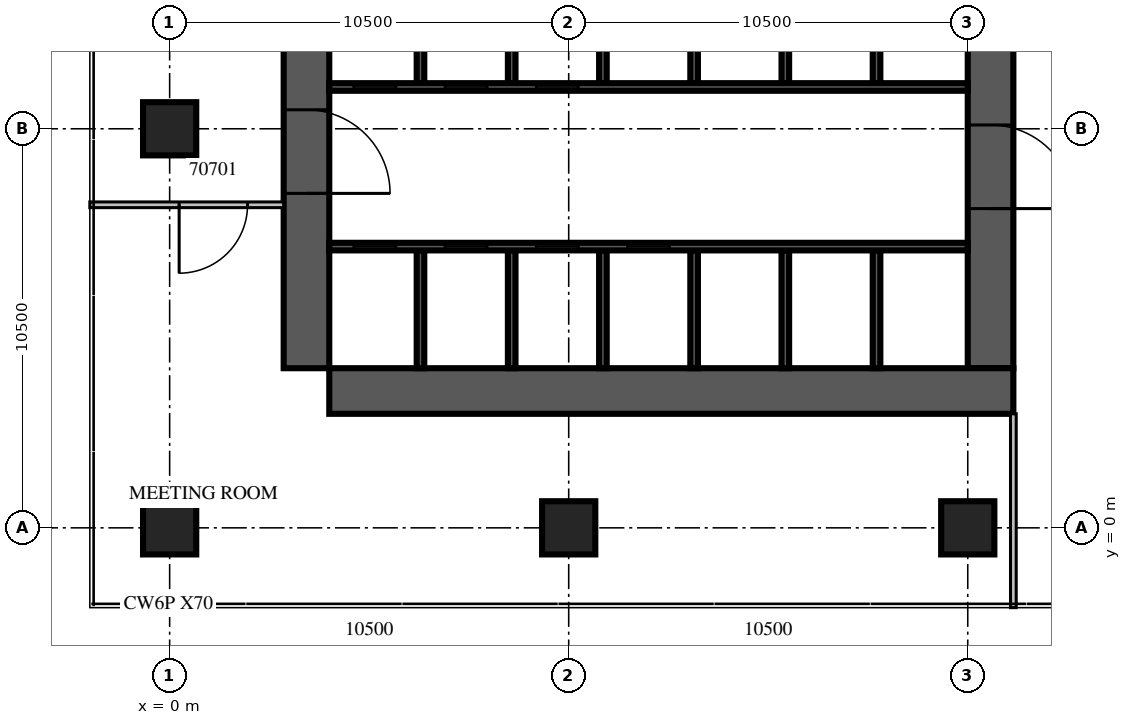
"""IFC4 building model, lengths in metres.
Left out: names, types, materials, properties, quantities, classifications, styles, units other than length and angle.
Written with IfcOpenShell. Run it as: python <this file> out.ifc"""

import sys

from ifc_helpers import new_model, si_unit, direction, frame, frame_2d, origin, origin_2d, place, context, subcontext, project, spatial, rectangle, extrude, source, transform, mapped, element, fill, save


model = new_model("IFC4")
c1 = context("Model", 3, precision=1e-05, world=origin(), true_north=direction((0.0, 1.0)))
c2 = subcontext(c1, "Body", "Model", "MODEL_VIEW")
j1 = project(units=[si_unit("LENGTHUNIT", "METRE"), si_unit("PLANEANGLEUNIT", "RADIAN")], contexts=[c1])
p1 = place(None, origin())
s1 = spatial("IfcSite", under=j1, at=p1, CompositionType="ELEMENT")
p2 = place(p1, origin())
s2 = spatial("IfcBuilding", under=s1, at=p2, CompositionType="ELEMENT")
p3 = place(p2, frame((0.0, 0.0, 23.7)))
s3 = spatial("IfcBuildingStorey", under=s2, at=p3, CompositionType="ELEMENT", Elevation=23.7)
m1 = source(origin(), c2, "Body", "SweptSolid", [
    extrude(rectangle(XDim=1.4, YDim=1.4, at=origin_2d()), origin(), (0.0, 0.0, 1.0), 5.4),
])
for number, where, z_axis, x_axis in (
    (1, (0.0, 0.0, 0.0), (0.0, 0.0, 1.0), (1.0, 0.0, 0.0)),
    (2, (0.0, 10.5, 0.0), (0.0, 0.0, 1.0), (1.0, 0.0, 0.0)),
    (3, (10.5, 0.0, 0.0), (0.0, 0.0, 1.0), (1.0, 0.0, 0.0)),
    (4, (21.0, 0.0, 0.0), (0.0, 0.0, 1.0), (1.0, 0.0, 0.0)),
):
    element("IfcColumn", number, at=place(p3, frame(where, z_axis=z_axis, x_axis=x_axis)), inside=s3, PredefinedType="COLUMN", context=c2, shape_type="MappedRepresentation", body=[
        mapped(m1, transform((0.0, 0.0, 0.0), scale=1.0)),
    ])
m2 = source(origin(), c2, "Body", "SweptSolid", [
    extrude(rectangle(XDim=18.0, YDim=1.2, at=frame_2d((9.0, 0.0))), origin(), (0.0, 0.0, 1.0), 5.4),
])
p4 = place(p3, frame((3.6, 4.2, 0.0), z_axis=(0.0, 0.0, 1.0), x_axis=(0.0, 1.0, 0.0)))
e5 = element("IfcWall", 5, at=p4, inside=s3, PredefinedType="SHEAR", context=c2, shape_type="MappedRepresentation", body=[
    mapped(m2, transform((0.0, 0.0, 0.0), scale=1.0)),
])
m3 = source(origin(), c2, "Body", "SweptSolid", [
    extrude(rectangle(XDim=2.2, YDim=2.1, at=frame_2d((1.1, 1.05))), frame((0.0, 0.61, 0.0), z_axis=(0.0, -1.0, 0.0), x_axis=(1.0, 0.0, 0.0)), (0.0, 0.0, 1.0), 1.22),
])
p5 = place(p4, frame((4.6, 0.0, 0.0)))
e6 = element("IfcOpeningElement", 6, at=p5, cuts=e5, PredefinedType="OPENING", context=c2, shape_type="MappedRepresentation", body=[
    mapped(m3, transform((0.0, 0.0, 0.0), scale=1.0)),
])
m4 = source(origin(), c2, "Body", "SweptSolid", [
    extrude(rectangle(XDim=16.8, YDim=1.2, at=frame_2d((8.4, 0.0))), origin(), (0.0, 0.0, 1.0), 5.4),
])
p6 = place(p3, frame((21.6, 4.2, 0.0), z_axis=(0.0, 0.0, 1.0), x_axis=(0.0, 1.0, 0.0)))
e7 = element("IfcWall", 7, at=p6, inside=s3, PredefinedType="SHEAR", context=c2, shape_type="MappedRepresentation", body=[
    mapped(m4, transform((0.0, 0.0, 0.0), scale=1.0)),
])
p7 = place(p6, frame((4.2, 0.0, 0.0)))
e8 = element("IfcOpeningElement", 8, at=p7, cuts=e7, PredefinedType="OPENING", context=c2, shape_type="MappedRepresentation", body=[
    mapped(m3, transform((0.0, 0.0, 0.0), scale=1.0)),
])
m5 = source(origin(), c2, "Body", "SweptSolid", [
    extrude(rectangle(XDim=1.2, YDim=2.1, at=frame_2d((0.6, 1.05))), frame((0.0, 0.61, 0.0), z_axis=(0.0, -1.0, 0.0), x_axis=(1.0, 0.0, 0.0)), (0.0, 0.0, 1.0), 1.22),
])
p8 = place(p6, frame((14.7, 0.0, 0.0)))
e9 = element("IfcOpeningElement", 9, at=p8, cuts=e7, PredefinedType="OPENING", context=c2, shape_type="MappedRepresentation", body=[
    mapped(m5, transform((0.0, 0.0, 0.0), scale=1.0)),
])
p9 = place(p3, frame((4.2, 3.6, 0.0), z_axis=(0.0, 0.0, 1.0), x_axis=(1.0, 0.0, 0.0)))
e10 = element("IfcWall", 10, at=p9, inside=s3, PredefinedType="SHEAR", context=c2, shape_type="MappedRepresentation", body=[
    mapped(m2, transform((0.0, 0.0, 0.0), scale=1.0)),
])
m6 = source(origin(), c2, "Body", "SweptSolid", [
    extrude(rectangle(XDim=3.1, YDim=0.2, at=frame_2d((1.55, 0.0))), origin(), (0.0, 0.0, 1.0), 5.4),
])
for number, where, z_axis, x_axis in (
    (11, (6.6, 4.2, 0.0), (0.0, 0.0, 1.0), (0.0, 1.0, 0.0)),
    (12, (9.0, 4.2, 0.0), (0.0, 0.0, 1.0), (0.0, 1.0, 0.0)),
    (13, (11.4, 4.2, 0.0), (0.0, 0.0, 1.0), (0.0, 1.0, 0.0)),
    (14, (13.8, 4.2, 0.0), (0.0, 0.0, 1.0), (0.0, 1.0, 0.0)),
    (15, (16.2, 4.2, 0.0), (0.0, 0.0, 1.0), (0.0, 1.0, 0.0)),
    (16, (18.6, 4.2, 0.0), (0.0, 0.0, 1.0), (0.0, 1.0, 0.0)),
):
    element("IfcWall", number, at=place(p3, frame(where, z_axis=z_axis, x_axis=x_axis)), inside=s3, PredefinedType="SOLIDWALL", context=c2, shape_type="MappedRepresentation", body=[
        mapped(m6, transform((0.0, 0.0, 0.0), scale=1.0)),
    ])
m7 = source(origin(), c2, "Body", "SweptSolid", [
    extrude(rectangle(XDim=3.0, YDim=0.2, at=frame_2d((1.5, 0.0))), origin(), (0.0, 0.0, 1.0), 5.4),
])
for number, where, z_axis, x_axis in (
    (17, (6.6, 11.7, 0.0), (0.0, 0.0, 1.0), (0.0, 1.0, 0.0)),
    (18, (9.0, 11.7, 0.0), (0.0, 0.0, 1.0), (0.0, 1.0, 0.0)),
    (19, (11.4, 11.7, 0.0), (0.0, 0.0, 1.0), (0.0, 1.0, 0.0)),
    (20, (13.8, 11.7, 0.0), (0.0, 0.0, 1.0), (0.0, 1.0, 0.0)),
    (21, (16.2, 11.7, 0.0), (0.0, 0.0, 1.0), (0.0, 1.0, 0.0)),
    (22, (18.6, 11.7, 0.0), (0.0, 0.0, 1.0), (0.0, 1.0, 0.0)),
):
    element("IfcWall", number, at=place(p3, frame(where, z_axis=z_axis, x_axis=x_axis)), inside=s3, PredefinedType="SOLIDWALL", context=c2, shape_type="MappedRepresentation", body=[
        mapped(m7, transform((0.0, 0.0, 0.0), scale=1.0)),
    ])
m8 = source(origin(), c2, "Body", "SweptSolid", [
    extrude(rectangle(XDim=16.8, YDim=0.2, at=frame_2d((8.4, 0.0))), origin(), (0.0, 0.0, 1.0), 5.4),
])
p10 = place(p3, frame((4.2, 7.4, 0.0), z_axis=(0.0, 0.0, 1.0), x_axis=(1.0, 0.0, 0.0)))
e23 = element("IfcWall", 23, at=p10, inside=s3, PredefinedType="SOLIDWALL", context=c2, shape_type="MappedRepresentation", body=[
    mapped(m8, transform((0.0, 0.0, 0.0), scale=1.0)),
])
m9 = source(origin(), c2, "Body", "SweptSolid", [
    extrude(rectangle(XDim=1.1, YDim=2.1, at=frame_2d((0.55, 1.05))), frame((0.0, 0.11, 0.0), z_axis=(0.0, -1.0, 0.0), x_axis=(1.0, 0.0, 0.0)), (0.0, 0.0, 1.0), 0.22),
])
p11 = place(p10, frame((0.65, 0.0, 0.0)))
e24 = element("IfcOpeningElement", 24, at=p11, cuts=e23, PredefinedType="OPENING", context=c2, shape_type="MappedRepresentation", body=[
    mapped(m9, transform((0.0, 0.0, 0.0), scale=1.0)),
])
p12 = place(p10, frame((3.05, 0.0, 0.0)))
e25 = element("IfcOpeningElement", 25, at=p12, cuts=e23, PredefinedType="OPENING", context=c2, shape_type="MappedRepresentation", body=[
    mapped(m9, transform((0.0, 0.0, 0.0), scale=1.0)),
])
p13 = place(p10, frame((5.45, 0.0, 0.0)))
e26 = element("IfcOpeningElement", 26, at=p13, cuts=e23, PredefinedType="OPENING", context=c2, shape_type="MappedRepresentation", body=[
    mapped(m9, transform((0.0, 0.0, 0.0), scale=1.0)),
])
p14 = place(p10, frame((7.85, 0.0, 0.0)))
e27 = element("IfcOpeningElement", 27, at=p14, cuts=e23, PredefinedType="OPENING", context=c2, shape_type="MappedRepresentation", body=[
    mapped(m9, transform((0.0, 0.0, 0.0), scale=1.0)),
])
p15 = place(p3, frame((4.2, 11.6, 0.0), z_axis=(0.0, 0.0, 1.0), x_axis=(1.0, 0.0, 0.0)))
e28 = element("IfcWall", 28, at=p15, inside=s3, PredefinedType="SOLIDWALL", context=c2, shape_type="MappedRepresentation", body=[
    mapped(m8, transform((0.0, 0.0, 0.0), scale=1.0)),
])
p16 = place(p15, frame((0.65, 0.0, 0.0)))
e29 = element("IfcOpeningElement", 29, at=p16, cuts=e28, PredefinedType="OPENING", context=c2, shape_type="MappedRepresentation", body=[
    mapped(m9, transform((0.0, 0.0, 0.0), scale=1.0)),
])
p17 = place(p15, frame((3.05, 0.0, 0.0)))
e30 = element("IfcOpeningElement", 30, at=p17, cuts=e28, PredefinedType="OPENING", context=c2, shape_type="MappedRepresentation", body=[
    mapped(m9, transform((0.0, 0.0, 0.0), scale=1.0)),
])
p18 = place(p15, frame((5.45, 0.0, 0.0)))
e31 = element("IfcOpeningElement", 31, at=p18, cuts=e28, PredefinedType="OPENING", context=c2, shape_type="MappedRepresentation", body=[
    mapped(m9, transform((0.0, 0.0, 0.0), scale=1.0)),
])
m10 = source(origin(), c2, "Body", "SweptSolid", [
    extrude(rectangle(XDim=5.1, YDim=0.15, at=frame_2d((2.55, 0.0))), origin(), (0.0, 0.0, 1.0), 4.8),
])
p19 = place(p3, frame((-2.1, 8.5, 0.0), z_axis=(0.0, 0.0, 1.0), x_axis=(1.0, 0.0, 0.0)))
e32 = element("IfcWall", 32, at=p19, inside=s3, PredefinedType="PARTITIONING", context=c2, shape_type="MappedRepresentation", body=[
    mapped(m10, transform((0.0, 0.0, 0.0), scale=1.0)),
])
m11 = source(origin(), c2, "Body", "SweptSolid", [
    extrude(rectangle(XDim=1.8, YDim=2.1, at=frame_2d((0.9, 1.05))), frame((0.0, 0.085, 0.0), z_axis=(0.0, -1.0, 0.0), x_axis=(1.0, 0.0, 0.0)), (0.0, 0.0, 1.0), 0.17),
])
p20 = place(p19, frame((2.35, 0.0, 0.0)))
e33 = element("IfcOpeningElement", 33, at=p20, cuts=e32, PredefinedType="OPENING", context=c2, shape_type="MappedRepresentation", body=[
    mapped(m11, transform((0.0, 0.0, 0.0), scale=1.0)),
])
p21 = place(p3, frame((22.2, -2.1, 0.0), z_axis=(0.0, 0.0, 1.0), x_axis=(0.0, 1.0, 0.0)))
e34 = element("IfcWall", 34, at=p21, inside=s3, PredefinedType="PARTITIONING", context=c2, shape_type="MappedRepresentation", body=[
    mapped(m10, transform((0.0, 0.0, 0.0), scale=1.0)),
])
m12 = source(origin(), c2, "Body", "SweptSolid", [
    extrude(rectangle(XDim=1.1, YDim=2.1, at=frame_2d((0.55, 1.05))), frame((0.0, 0.025, 0.0), z_axis=(0.0, -1.0, 0.0), x_axis=(1.0, 0.0, 0.0)), (0.0, 0.0, 1.0), 0.05),
])
p22 = place(p11, origin())
e35 = element("IfcDoor", 35, at=p22, inside=s3, OperationType="SLIDING_TO_LEFT", PredefinedType="DOOR", context=c2, shape_type="MappedRepresentation", body=[
    mapped(m12, transform((0.0, 0.0, 0.0), scale=1.0)),
])
fill(e24, e35)
p23 = place(p12, origin())
e36 = element("IfcDoor", 36, at=p23, inside=s3, OperationType="SLIDING_TO_LEFT", PredefinedType="DOOR", context=c2, shape_type="MappedRepresentation", body=[
    mapped(m12, transform((0.0, 0.0, 0.0), scale=1.0)),
])
fill(e25, e36)
p24 = place(p13, origin())
e37 = element("IfcDoor", 37, at=p24, inside=s3, OperationType="SLIDING_TO_LEFT", PredefinedType="DOOR", context=c2, shape_type="MappedRepresentation", body=[
    mapped(m12, transform((0.0, 0.0, 0.0), scale=1.0)),
])
fill(e26, e37)
p25 = place(p14, origin())
e38 = element("IfcDoor", 38, at=p25, inside=s3, OperationType="SLIDING_TO_LEFT", PredefinedType="DOOR", context=c2, shape_type="MappedRepresentation", body=[
    mapped(m12, transform((0.0, 0.0, 0.0), scale=1.0)),
])
fill(e27, e38)
p26 = place(p16, origin())
e39 = element("IfcDoor", 39, at=p26, inside=s3, OperationType="SLIDING_TO_LEFT", PredefinedType="DOOR", context=c2, shape_type="MappedRepresentation", body=[
    mapped(m12, transform((0.0, 0.0, 0.0), scale=1.0)),
])
fill(e29, e39)
p27 = place(p17, origin())
e40 = element("IfcDoor", 40, at=p27, inside=s3, OperationType="SLIDING_TO_LEFT", PredefinedType="DOOR", context=c2, shape_type="MappedRepresentation", body=[
    mapped(m12, transform((0.0, 0.0, 0.0), scale=1.0)),
])
fill(e30, e40)
p28 = place(p18, origin())
e41 = element("IfcDoor", 41, at=p28, inside=s3, OperationType="SLIDING_TO_LEFT", PredefinedType="DOOR", context=c2, shape_type="MappedRepresentation", body=[
    mapped(m12, transform((0.0, 0.0, 0.0), scale=1.0)),
])
fill(e31, e41)
m13 = source(origin(), c2, "Body", "SweptSolid", [
    extrude(rectangle(XDim=2.2, YDim=2.1, at=frame_2d((1.1, 1.05))), frame((0.0, 0.025, 0.0), z_axis=(0.0, -1.0, 0.0), x_axis=(1.0, 0.0, 0.0)), (0.0, 0.0, 1.0), 0.05),
])
p29 = place(p7, origin())
e42 = element("IfcDoor", 42, at=p29, inside=s3, OperationType="DOUBLE_DOOR_SINGLE_SWING", PredefinedType="DOOR", context=c2, shape_type="MappedRepresentation", body=[
    mapped(m13, transform((0.0, 0.0, 0.0), scale=1.0)),
])
fill(e8, e42)
p30 = place(p5, origin())
e43 = element("IfcDoor", 43, at=p30, inside=s3, OperationType="DOUBLE_DOOR_SINGLE_SWING", PredefinedType="DOOR", context=c2, shape_type="MappedRepresentation", body=[
    mapped(m13, transform((0.0, 0.0, 0.0), scale=1.0)),
])
fill(e6, e43)
m14 = source(origin(), c2, "Body", "SweptSolid", [
    extrude(rectangle(XDim=1.8, YDim=2.1, at=frame_2d((0.9, 1.05))), frame((0.0, 0.025, 0.0), z_axis=(0.0, -1.0, 0.0), x_axis=(1.0, 0.0, 0.0)), (0.0, 0.0, 1.0), 0.05),
])
p31 = place(p20, origin())
e44 = element("IfcDoor", 44, at=p31, inside=s3, OperationType="DOUBLE_DOOR_SINGLE_SWING", PredefinedType="DOOR", context=c2, shape_type="MappedRepresentation", body=[
    mapped(m14, transform((0.0, 0.0, 0.0), scale=1.0)),
])
fill(e33, e44)
save(model, sys.argv[1])
